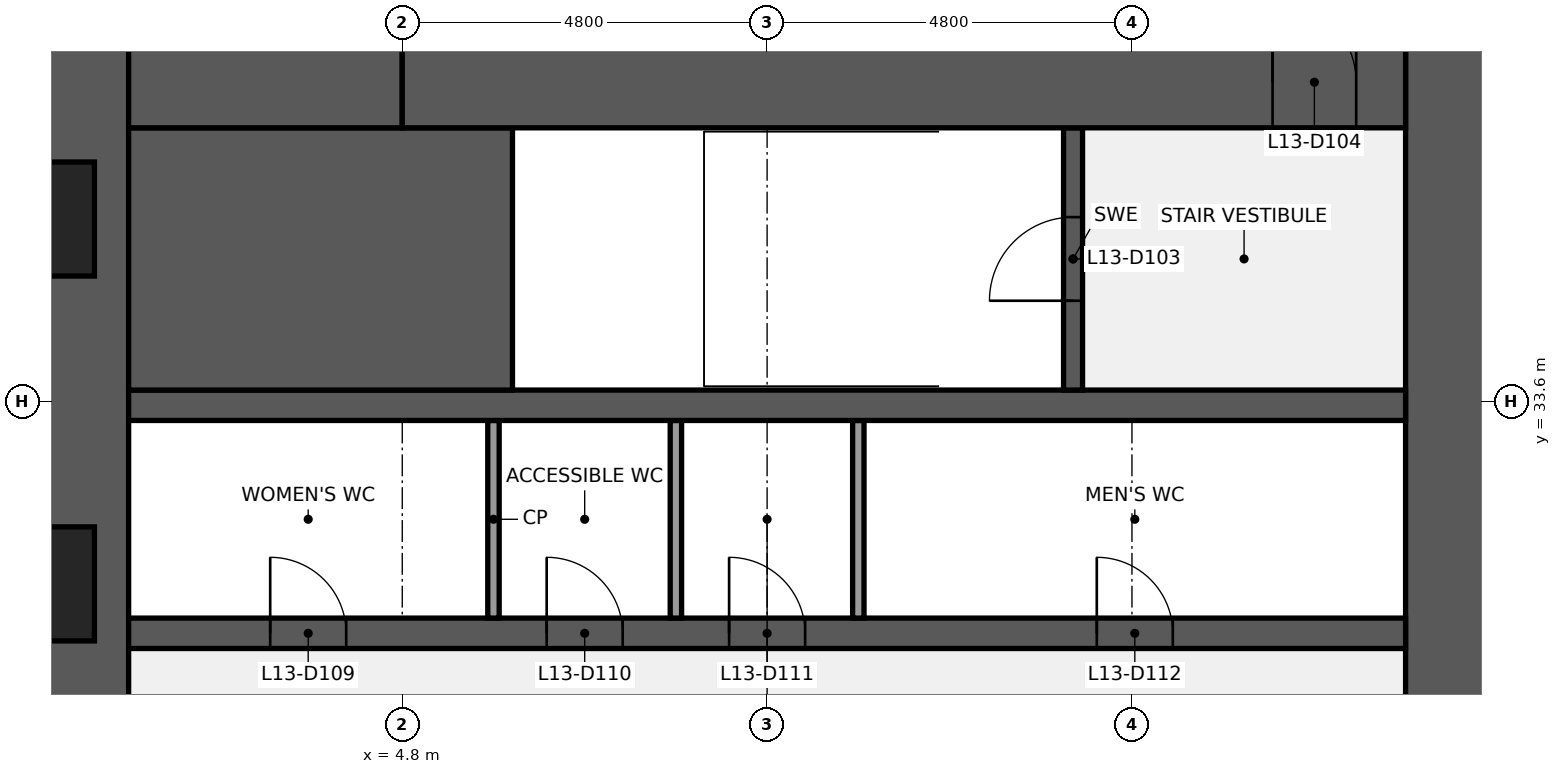
"""IFC4 building model, lengths in metres.
Left out: names, types, materials, properties, quantities, classifications, styles, units other than length and angle.
Written with IfcOpenShell. Run it as: python <this file> out.ifc"""

import sys

from ifc_helpers import new_model, si_unit, direction, frame, frame_2d, origin, place, context, subcontext, project, spatial, rectangle, extrude, element, fill, save


model = new_model("IFC4")
c1 = context("Model", 3, precision=1e-05, world=origin(), true_north=direction((0.0, 1.0)))
c2 = subcontext(c1, "Body", "Model", "MODEL_VIEW")
j1 = project(units=[si_unit("LENGTHUNIT", "METRE"), si_unit("PLANEANGLEUNIT", "RADIAN")], contexts=[c1])
p1 = place(None, origin())
s1 = spatial("IfcSite", under=j1, at=p1, CompositionType="ELEMENT")
p2 = place(p1, origin())
s2 = spatial("IfcBuilding", under=s1, at=p2, CompositionType="ELEMENT")
p3 = place(p2, frame((0.0, 0.0, 63.0)))
s3 = spatial("IfcBuildingStorey", under=s2, at=p3, CompositionType="ELEMENT", Elevation=63.0)
p4 = place(p3, frame((0.6, 9.6, 0.0), z_axis=(0.0, 0.0, 1.0), x_axis=(0.0, 1.0, 0.0)))
e1 = element("IfcWall", 1, at=p4, inside=s3, PredefinedType="SHEAR", context=c2, shape_type="SweptSolid", body=[
    extrude(rectangle(XDim=28.8, YDim=1.2, at=frame_2d((14.4, 0.0))), origin(), (0.0, 0.0, 1.0), 3.84),
])
p5 = place(p4, frame((8.85, 0.0, 0.9)))
e2 = element("IfcOpeningElement", 2, at=p5, cuts=e1, PredefinedType="OPENING", context=c2, shape_type="SweptSolid", body=[
    extrude(rectangle(XDim=1.5, YDim=1.5, at=frame_2d((0.75, 0.75))), frame((0.0, 0.61, 0.0), z_axis=(0.0, -1.0, 0.0), x_axis=(1.0, 0.0, 0.0)), (0.0, 0.0, 1.0), 1.22),
])
p6 = place(p4, frame((18.45, 0.0, 0.9)))
e3 = element("IfcOpeningElement", 3, at=p6, cuts=e1, PredefinedType="OPENING", context=c2, shape_type="SweptSolid", body=[
    extrude(rectangle(XDim=1.5, YDim=1.5, at=frame_2d((0.75, 0.75))), frame((0.0, 0.61, 0.0), z_axis=(0.0, -1.0, 0.0), x_axis=(1.0, 0.0, 0.0)), (0.0, 0.0, 1.0), 1.22),
])
p7 = place(p3, frame((18.6, 38.4, 0.0), z_axis=(0.0, 0.0, 1.0), x_axis=(0.0, -1.0, 0.0)))
e4 = element("IfcWall", 4, at=p7, inside=s3, PredefinedType="SHEAR", context=c2, shape_type="SweptSolid", body=[
    extrude(rectangle(XDim=28.8, YDim=1.2, at=frame_2d((14.4, 0.0))), origin(), (0.0, 0.0, 1.0), 3.84),
])
p8 = place(p7, frame((18.3, 0.0, 0.0)))
e5 = element("IfcOpeningElement", 5, at=p8, cuts=e4, PredefinedType="OPENING", context=c2, shape_type="SweptSolid", body=[
    extrude(rectangle(XDim=1.8, YDim=2.1, at=frame_2d((0.9, 1.05))), frame((0.0, 0.61, 0.0), z_axis=(0.0, -1.0, 0.0), x_axis=(1.0, 0.0, 0.0)), (0.0, 0.0, 1.0), 1.22),
])
p9 = place(p7, frame((8.7, 0.0, 0.0)))
e6 = element("IfcOpeningElement", 6, at=p9, cuts=e4, PredefinedType="OPENING", context=c2, shape_type="SweptSolid", body=[
    extrude(rectangle(XDim=1.8, YDim=2.1, at=frame_2d((0.9, 1.05))), frame((0.0, 0.61, 0.0), z_axis=(0.0, -1.0, 0.0), x_axis=(1.0, 0.0, 0.0)), (0.0, 0.0, 1.0), 1.22),
])
p10 = place(p3, frame((1.2, 30.55, 0.0), z_axis=(0.0, 0.0, 1.0), x_axis=(1.0, 0.0, 0.0)))
e7 = element("IfcWall", 7, at=p10, inside=s3, PredefinedType="SHEAR", context=c2, shape_type="SweptSolid", body=[
    extrude(rectangle(XDim=16.8, YDim=0.4, at=frame_2d((8.4, 0.0))), origin(), (0.0, 0.0, 1.0), 3.84),
])
p11 = place(p10, frame((1.863, 0.0, 0.0)))
e8 = element("IfcOpeningElement", 8, at=p11, cuts=e7, PredefinedType="OPENING", context=c2, shape_type="SweptSolid", body=[
    extrude(rectangle(XDim=1.0, YDim=2.1, at=frame_2d((0.5, 1.05))), frame((0.0, 0.21, 0.0), z_axis=(0.0, -1.0, 0.0), x_axis=(1.0, 0.0, 0.0)), (0.0, 0.0, 1.0), 0.42),
])
p12 = place(p10, frame((5.5, 0.0, 0.0)))
e9 = element("IfcOpeningElement", 9, at=p12, cuts=e7, PredefinedType="OPENING", context=c2, shape_type="SweptSolid", body=[
    extrude(rectangle(XDim=1.0, YDim=2.1, at=frame_2d((0.5, 1.05))), frame((0.0, 0.21, 0.0), z_axis=(0.0, -1.0, 0.0), x_axis=(1.0, 0.0, 0.0)), (0.0, 0.0, 1.0), 0.42),
])
p13 = place(p10, frame((7.9, 0.0, 0.0)))
e10 = element("IfcOpeningElement", 10, at=p13, cuts=e7, PredefinedType="OPENING", context=c2, shape_type="SweptSolid", body=[
    extrude(rectangle(XDim=1.0, YDim=2.1, at=frame_2d((0.5, 1.05))), frame((0.0, 0.21, 0.0), z_axis=(0.0, -1.0, 0.0), x_axis=(1.0, 0.0, 0.0)), (0.0, 0.0, 1.0), 0.42),
])
p14 = place(p10, frame((12.738, 0.0, 0.0)))
e11 = element("IfcOpeningElement", 11, at=p14, cuts=e7, PredefinedType="OPENING", context=c2, shape_type="SweptSolid", body=[
    extrude(rectangle(XDim=1.0, YDim=2.1, at=frame_2d((0.5, 1.05))), frame((0.0, 0.21, 0.0), z_axis=(0.0, -1.0, 0.0), x_axis=(1.0, 0.0, 0.0)), (0.0, 0.0, 1.0), 0.42),
])
for number, where, z_axis, x_axis in (
    (12, (6.0, 30.75, 0.0), (0.0, 0.0, 1.0), (0.0, 1.0, 0.0)),
    (13, (8.4, 30.75, 0.0), (0.0, 0.0, 1.0), (0.0, 1.0, 0.0)),
    (14, (10.8, 30.75, 0.0), (0.0, 0.0, 1.0), (0.0, 1.0, 0.0)),
):
    element("IfcWall", number, at=place(p3, frame(where, z_axis=z_axis, x_axis=x_axis)), inside=s3, PredefinedType="PARTITIONING", context=c2, shape_type="SweptSolid", body=[
        extrude(rectangle(XDim=2.6, YDim=0.15, at=frame_2d((1.3, 0.0))), origin(), (0.0, 0.0, 1.0), 3.84),
    ])
p15 = place(p3, frame((1.2, 33.55, 0.0), z_axis=(0.0, 0.0, 1.0), x_axis=(1.0, 0.0, 0.0)))
e15 = element("IfcWall", 15, at=p15, inside=s3, PredefinedType="SHEAR", context=c2, shape_type="SweptSolid", body=[
    extrude(rectangle(XDim=16.8, YDim=0.4, at=frame_2d((8.4, 0.0))), origin(), (0.0, 0.0, 1.0), 3.84),
])
p16 = place(p3, frame((1.2, 35.475, 0.0), z_axis=(0.0, 0.0, 1.0), x_axis=(1.0, 0.0, 0.0)))
e16 = element("IfcWall", 16, at=p16, inside=s3, PredefinedType="SHEAR", context=c2, shape_type="SweptSolid", body=[
    extrude(rectangle(XDim=5.05, YDim=3.45, at=frame_2d((2.525, 0.0))), origin(), (0.0, 0.0, 1.0), 3.84),
])
p17 = place(p3, frame((13.625, 33.75, 0.0), z_axis=(0.0, 0.0, 1.0), x_axis=(0.0, 1.0, 0.0)))
e17 = element("IfcWall", 17, at=p17, inside=s3, PredefinedType="SHEAR", context=c2, shape_type="SweptSolid", body=[
    extrude(rectangle(XDim=3.45, YDim=0.25, at=frame_2d((1.725, 0.0))), origin(), (0.0, 0.0, 1.0), 3.84),
])
p18 = place(p17, frame((1.175, 0.0, 0.0)))
e18 = element("IfcOpeningElement", 18, at=p18, cuts=e17, PredefinedType="OPENING", context=c2, shape_type="SweptSolid", body=[
    extrude(rectangle(XDim=1.1, YDim=2.1, at=frame_2d((0.55, 1.05))), frame((0.0, 0.135, 0.0), z_axis=(0.0, -1.0, 0.0), x_axis=(1.0, 0.0, 0.0)), (0.0, 0.0, 1.0), 0.27),
])
p19 = place(p3, frame((1.2, 37.8, 0.0), z_axis=(0.0, 0.0, 1.0), x_axis=(1.0, 0.0, 0.0)))
e19 = element("IfcWall", 19, at=p19, inside=s3, PredefinedType="SHEAR", context=c2, shape_type="SweptSolid", body=[
    extrude(rectangle(XDim=3.6, YDim=1.2, at=frame_2d((1.8, 0.0))), origin(), (0.0, 0.0, 1.0), 3.84),
])
p20 = place(p3, frame((4.8, 37.8, 0.0), z_axis=(0.0, 0.0, 1.0), x_axis=(1.0, 0.0, 0.0)))
e20 = element("IfcWall", 20, at=p20, inside=s3, PredefinedType="SHEAR", context=c2, shape_type="SweptSolid", body=[
    extrude(rectangle(XDim=13.2, YDim=1.2, at=frame_2d((6.6, 0.0))), origin(), (0.0, 0.0, 1.0), 3.84),
])
p21 = place(p20, frame((11.45, 0.0, 0.0)))
e21 = element("IfcOpeningElement", 21, at=p21, cuts=e20, PredefinedType="OPENING", context=c2, shape_type="SweptSolid", body=[
    extrude(rectangle(XDim=1.1, YDim=2.1, at=frame_2d((0.55, 1.05))), frame((0.0, 0.61, 0.0), z_axis=(0.0, -1.0, 0.0), x_axis=(1.0, 0.0, 0.0)), (0.0, 0.0, 1.0), 1.22),
])
p22 = place(p18, origin())
e22 = element("IfcDoor", 22, at=p22, inside=s3, OperationType="SINGLE_SWING_LEFT", PredefinedType="DOOR", context=c2, shape_type="SweptSolid", body=[
    extrude(rectangle(XDim=1.1, YDim=2.1, at=frame_2d((0.55, 1.05))), frame((0.0, 0.025, 0.0), z_axis=(0.0, -1.0, 0.0), x_axis=(1.0, 0.0, 0.0)), (0.0, 0.0, 1.0), 0.05),
])
fill(e18, e22)
p23 = place(p21, origin())
e23 = element("IfcDoor", 23, at=p23, inside=s3, OperationType="SINGLE_SWING_LEFT", PredefinedType="DOOR", context=c2, shape_type="SweptSolid", body=[
    extrude(rectangle(XDim=1.1, YDim=2.1, at=frame_2d((0.55, 1.05))), frame((0.0, 0.025, 0.0), z_axis=(0.0, -1.0, 0.0), x_axis=(1.0, 0.0, 0.0)), (0.0, 0.0, 1.0), 0.05),
])
fill(e21, e23)
p24 = place(p11, origin())
e24 = element("IfcDoor", 24, at=p24, inside=s3, OperationType="SINGLE_SWING_LEFT", PredefinedType="DOOR", context=c2, shape_type="SweptSolid", body=[
    extrude(rectangle(XDim=1.0, YDim=2.1, at=frame_2d((0.5, 1.05))), frame((0.0, 0.025, 0.0), z_axis=(0.0, -1.0, 0.0), x_axis=(1.0, 0.0, 0.0)), (0.0, 0.0, 1.0), 0.05),
])
fill(e8, e24)
p25 = place(p12, origin())
e25 = element("IfcDoor", 25, at=p25, inside=s3, OperationType="SINGLE_SWING_LEFT", PredefinedType="DOOR", context=c2, shape_type="SweptSolid", body=[
    extrude(rectangle(XDim=1.0, YDim=2.1, at=frame_2d((0.5, 1.05))), frame((0.0, 0.025, 0.0), z_axis=(0.0, -1.0, 0.0), x_axis=(1.0, 0.0, 0.0)), (0.0, 0.0, 1.0), 0.05),
])
fill(e9, e25)
p26 = place(p13, origin())
e26 = element("IfcDoor", 26, at=p26, inside=s3, OperationType="SINGLE_SWING_LEFT", PredefinedType="DOOR", context=c2, shape_type="SweptSolid", body=[
    extrude(rectangle(XDim=1.0, YDim=2.1, at=frame_2d((0.5, 1.05))), frame((0.0, 0.025, 0.0), z_axis=(0.0, -1.0, 0.0), x_axis=(1.0, 0.0, 0.0)), (0.0, 0.0, 1.0), 0.05),
])
fill(e10, e26)
p27 = place(p14, origin())
e27 = element("IfcDoor", 27, at=p27, inside=s3, OperationType="SINGLE_SWING_LEFT", PredefinedType="DOOR", context=c2, shape_type="SweptSolid", body=[
    extrude(rectangle(XDim=1.0, YDim=2.1, at=frame_2d((0.5, 1.05))), frame((0.0, 0.025, 0.0), z_axis=(0.0, -1.0, 0.0), x_axis=(1.0, 0.0, 0.0)), (0.0, 0.0, 1.0), 0.05),
])
fill(e11, e27)
save(model, sys.argv[1])
